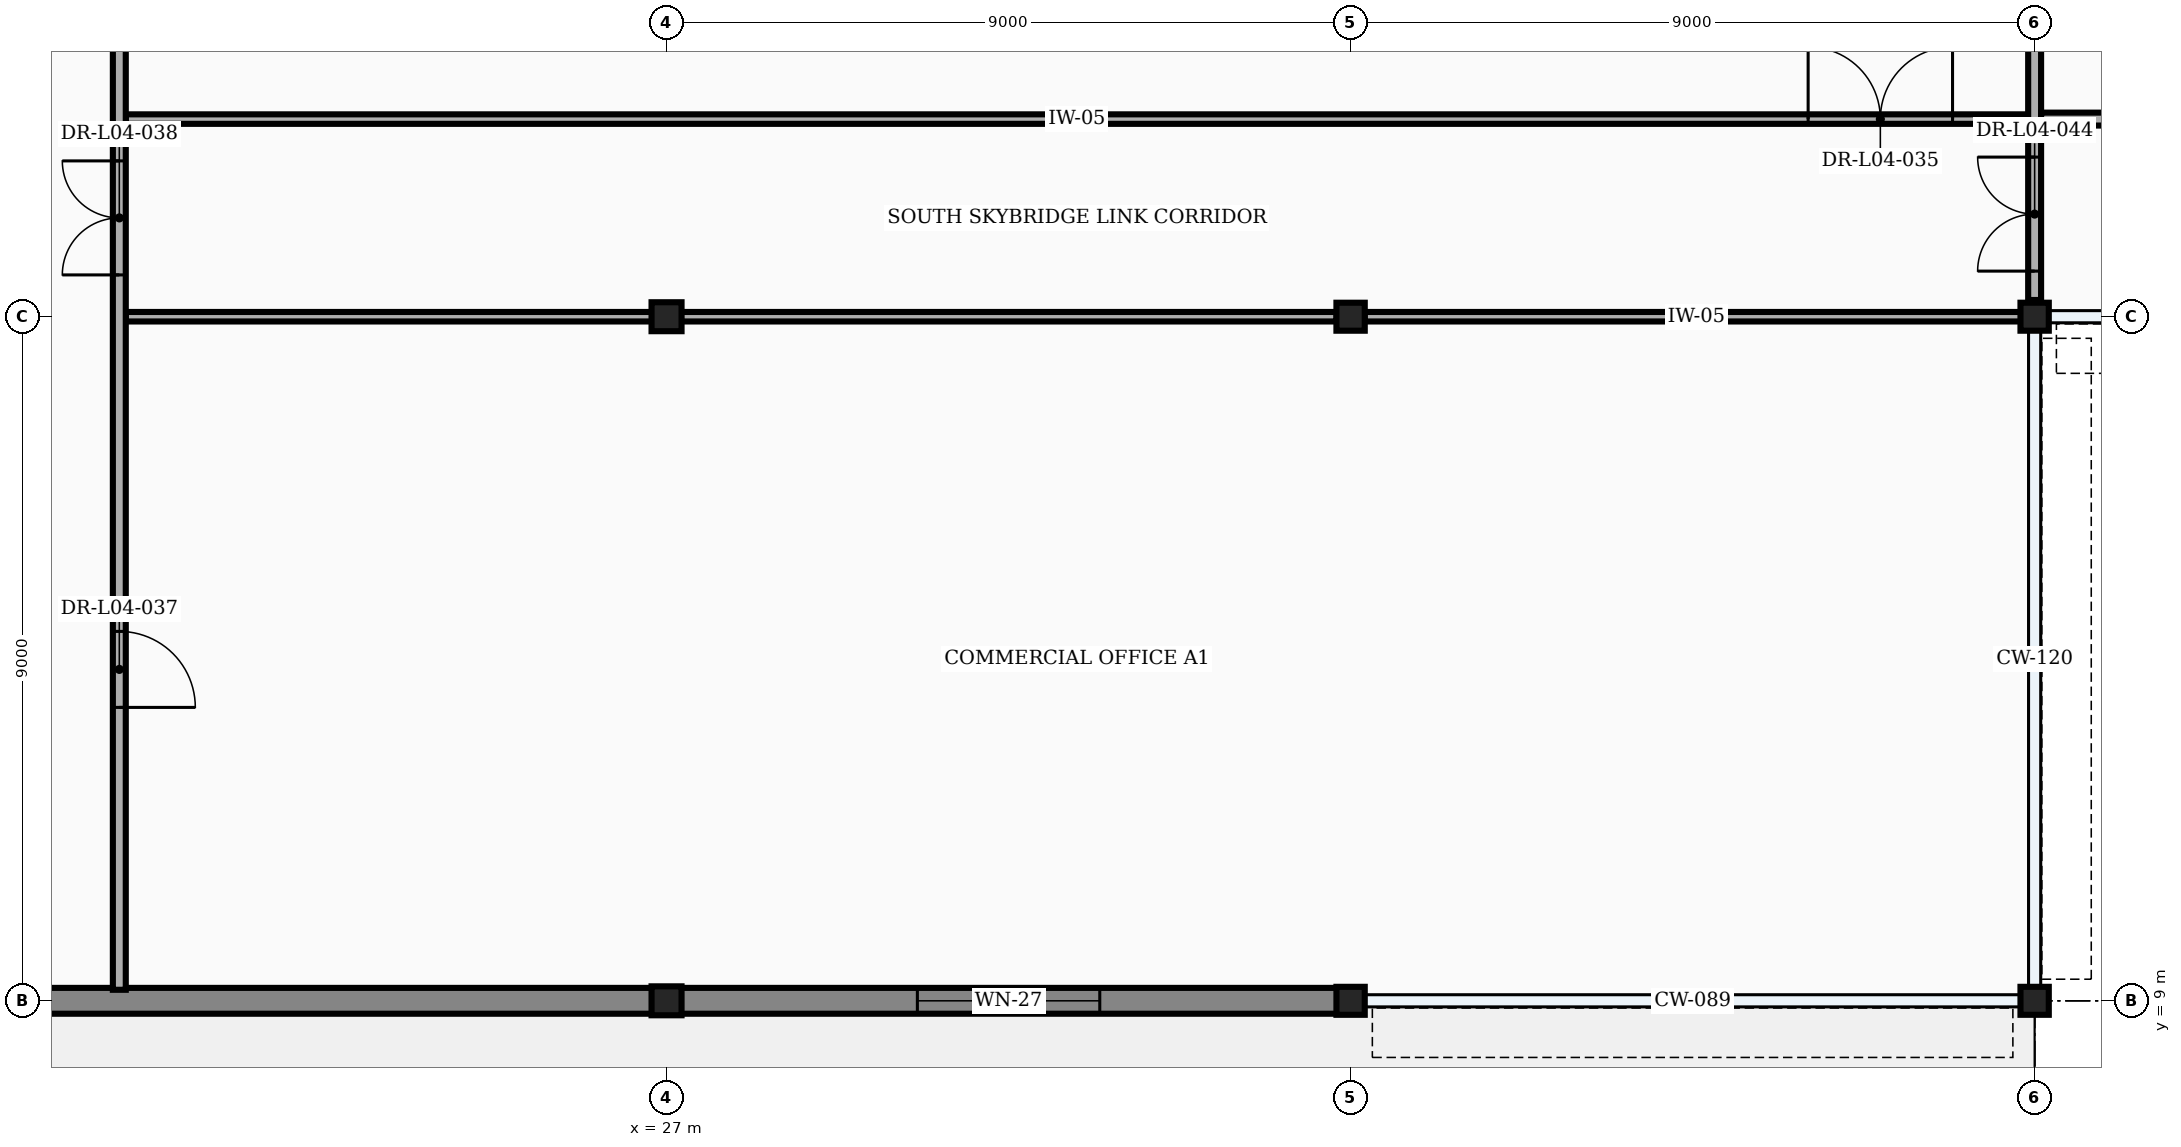
"""IFC4 building model, lengths in metres.
Left out: names, types, materials, properties, quantities, classifications, styles, units other than length and angle.
Written with IfcOpenShell. Run it as: python <this file> out.ifc"""

import sys

from ifc_helpers import new_model, si_unit, direction, frame, frame_2d, origin, origin_2d, place, context, subcontext, project, spatial, rectangle, i_section, extrude, element, fill, save


model = new_model("IFC4")
c1 = context("Model", 3, precision=1e-05, world=origin(), true_north=direction((0.0, 1.0)))
c2 = subcontext(c1, "Body", "Model", "MODEL_VIEW")
j1 = project(units=[si_unit("LENGTHUNIT", "METRE"), si_unit("PLANEANGLEUNIT", "RADIAN")], contexts=[c1])
p1 = place(None, origin())
s1 = spatial("IfcSite", under=j1, at=p1, CompositionType="ELEMENT")
p2 = place(p1, origin())
s2 = spatial("IfcBuilding", under=s1, at=p2, CompositionType="ELEMENT")
p3 = place(p2, frame((0.0, 0.0, 21.6)))
s3 = spatial("IfcBuildingStorey", under=s2, at=p3, CompositionType="ELEMENT", Elevation=21.6)
for number, where, z_axis, x_axis in (
    (1, (27.0, 9.0, 0.0), (0.0, 0.0, 1.0), (1.0, 0.0, 0.0)),
    (2, (27.0, 18.0, 0.0), (0.0, 0.0, 1.0), (1.0, 0.0, 0.0)),
):
    element("IfcColumn", number, at=place(p3, frame(where, z_axis=z_axis, x_axis=x_axis)), inside=s3, PredefinedType="COLUMN", context=c2, shape_type="SweptSolid", body=[
        extrude(i_section(OverallWidth=0.395, OverallDepth=0.381, WebThickness=0.018, FlangeThickness=0.03, at=origin_2d()), origin(), (0.0, 0.0, 1.0), 3.9),
    ])
for number, where, z_axis, x_axis in (
    (3, (36.0, 9.0, 0.0), (0.0, 0.0, 1.0), (1.0, 0.0, 0.0)),
    (4, (36.0, 18.0, 0.0), (0.0, 0.0, 1.0), (1.0, 0.0, 0.0)),
    (5, (45.0, 9.0, 0.0), (0.0, 0.0, 1.0), (1.0, 0.0, 0.0)),
    (6, (45.0, 18.0, 0.0), (0.0, 0.0, 1.0), (1.0, 0.0, 0.0)),
):
    element("IfcColumn", number, at=place(p3, frame(where, z_axis=z_axis, x_axis=x_axis)), inside=s3, PredefinedType="COLUMN", context=c2, shape_type="SweptSolid", body=[
        extrude(i_section(OverallWidth=0.373, OverallDepth=0.368, WebThickness=0.014, FlangeThickness=0.024, FilletRadius=0.015, at=origin_2d()), origin(), (0.0, 0.0, 1.0), 3.9),
    ])
p4 = place(p3, frame((9.01, 9.0, 0.0), z_axis=(0.0, 0.0, 1.0), x_axis=(1.0, 0.0, 0.0)))
e7 = element("IfcWall", 7, at=p4, inside=s3, PredefinedType="STANDARD", context=c2, shape_type="SweptSolid", body=[
    extrude(rectangle(XDim=17.98, YDim=0.34, at=frame_2d((8.99, 0.0))), origin(), (0.0, 0.0, 1.0), 3.245),
])
p5 = place(p4, frame((8.39, 0.0, 0.7)))
e8 = element("IfcOpeningElement", 8, at=p5, cuts=e7, PredefinedType="OPENING", context=c2, shape_type="SweptSolid", body=[
    extrude(rectangle(XDim=1.2, YDim=1.95, at=frame_2d((0.6, 0.975))), frame((0.0, 0.182, 0.0), z_axis=(0.0, -1.0, 0.0), x_axis=(1.0, 0.0, 0.0)), (0.0, 0.0, 1.0), 0.364),
])
p6 = place(p3, frame((27.01, 9.0, 0.0), z_axis=(0.0, 0.0, 1.0), x_axis=(1.0, 0.0, 0.0)))
e9 = element("IfcWall", 9, at=p6, inside=s3, PredefinedType="STANDARD", context=c2, shape_type="SweptSolid", body=[
    extrude(rectangle(XDim=8.98, YDim=0.34, at=frame_2d((4.49, 0.0))), origin(), (0.0, 0.0, 1.0), 3.585),
])
p7 = place(p6, frame((3.29, 0.0, 0.7)))
e10 = element("IfcOpeningElement", 10, at=p7, cuts=e9, PredefinedType="OPENING", context=c2, shape_type="SweptSolid", body=[
    extrude(rectangle(XDim=2.4, YDim=1.95, at=frame_2d((1.2, 0.975))), frame((0.0, 0.182, 0.0), z_axis=(0.0, -1.0, 0.0), x_axis=(1.0, 0.0, 0.0)), (0.0, 0.0, 1.0), 0.364),
])
p8 = place(p3, frame((19.885, 18.0, 0.0), z_axis=(0.0, 0.0, 1.0), x_axis=(1.0, 0.0, 0.0)))
e11 = element("IfcWall", 11, at=p8, inside=s3, PredefinedType="PARTITIONING", context=c2, shape_type="SweptSolid", body=[
    extrude(rectangle(XDim=6.925, YDim=0.125, at=frame_2d((3.462, 0.0))), origin(), (0.0, 0.0, 1.0), 3.245),
])
p9 = place(p3, frame((27.19, 18.0, 0.0), z_axis=(0.0, 0.0, 1.0), x_axis=(1.0, 0.0, 0.0)))
e12 = element("IfcWall", 12, at=p9, inside=s3, PredefinedType="PARTITIONING", context=c2, shape_type="SweptSolid", body=[
    extrude(rectangle(XDim=8.625, YDim=0.125, at=frame_2d((4.313, 0.0))), origin(), (0.0, 0.0, 1.0), 3.324),
])
p10 = place(p3, frame((36.184, 18.0, 0.0), z_axis=(0.0, 0.0, 1.0), x_axis=(1.0, 0.0, 0.0)))
e13 = element("IfcWall", 13, at=p10, inside=s3, PredefinedType="PARTITIONING", context=c2, shape_type="SweptSolid", body=[
    extrude(rectangle(XDim=8.731, YDim=0.125, at=frame_2d((4.365, 0.0))), origin(), (0.0, 0.0, 1.0), 3.285),
])
p11 = place(p3, frame((19.885, 20.6, 0.0), z_axis=(0.0, 0.0, 1.0), x_axis=(1.0, 0.0, 0.0)))
e14 = element("IfcWall", 14, at=p11, inside=s3, PredefinedType="PARTITIONING", context=c2, shape_type="SweptSolid", body=[
    extrude(rectangle(XDim=25.03, YDim=0.125, at=frame_2d((12.515, 0.0))), origin(), (0.0, 0.0, 1.0), 3.585),
])
p12 = place(p11, frame((22.135, 0.0, 0.0)))
e15 = element("IfcOpeningElement", 15, at=p12, cuts=e14, PredefinedType="OPENING", context=c2, shape_type="SweptSolid", body=[
    extrude(rectangle(XDim=1.9, YDim=2.35, at=frame_2d((0.95, 1.175))), frame((0.0, 0.074, 0.0), z_axis=(0.0, -1.0, 0.0), x_axis=(1.0, 0.0, 0.0)), (0.0, 0.0, 1.0), 0.149),
])
p13 = place(p3, frame((19.8, 9.145, 0.0), z_axis=(0.0, 0.0, 1.0), x_axis=(0.0, 1.0, 0.0)))
e16 = element("IfcWall", 16, at=p13, inside=s3, PredefinedType="PARTITIONING", context=c2, shape_type="SweptSolid", body=[
    extrude(rectangle(XDim=30.095, YDim=0.17, at=frame_2d((15.047, 0.0))), origin(), (0.0, 0.0, 1.0), 3.585),
])
p14 = place(p13, frame((3.715, 0.0, 0.0)))
e17 = element("IfcOpeningElement", 17, at=p14, cuts=e16, PredefinedType="OPENING", context=c2, shape_type="SweptSolid", body=[
    extrude(rectangle(XDim=1.0, YDim=2.15, at=frame_2d((0.5, 1.075))), frame((0.0, 0.097, 0.0), z_axis=(0.0, -1.0, 0.0), x_axis=(1.0, 0.0, 0.0)), (0.0, 0.0, 1.0), 0.194),
])
p15 = place(p13, frame((9.405, 0.0, 0.0)))
e18 = element("IfcOpeningElement", 18, at=p15, cuts=e16, PredefinedType="OPENING", context=c2, shape_type="SweptSolid", body=[
    extrude(rectangle(XDim=1.5, YDim=2.2, at=frame_2d((0.75, 1.1))), frame((0.0, 0.097, 0.0), z_axis=(0.0, -1.0, 0.0), x_axis=(1.0, 0.0, 0.0)), (0.0, 0.0, 1.0), 0.194),
])
p16 = place(p13, frame((24.515, 0.0, 0.0)))
e19 = element("IfcOpeningElement", 19, at=p16, cuts=e16, PredefinedType="OPENING", context=c2, shape_type="SweptSolid", body=[
    extrude(rectangle(XDim=1.28, YDim=2.2, at=frame_2d((0.64, 1.1))), frame((0.0, 0.097, 0.0), z_axis=(0.0, -1.0, 0.0), x_axis=(1.0, 0.0, 0.0)), (0.0, 0.0, 1.0), 0.194),
])
p17 = place(p3, frame((45.0, 18.22, 0.0), z_axis=(0.0, 0.0, 1.0), x_axis=(0.0, 1.0, 0.0)))
e20 = element("IfcWall", 20, at=p17, inside=s3, PredefinedType="PARTITIONING", context=c2, shape_type="SweptSolid", body=[
    extrude(rectangle(XDim=8.56, YDim=0.17, at=frame_2d((4.28, 0.0))), origin(), (0.0, 0.0, 1.0), 3.052),
])
p18 = place(p17, frame((0.38, 0.0, 0.0)))
e21 = element("IfcOpeningElement", 21, at=p18, cuts=e20, PredefinedType="OPENING", context=c2, shape_type="SweptSolid", body=[
    extrude(rectangle(XDim=1.5, YDim=2.2, at=frame_2d((0.75, 1.1))), frame((0.0, 0.097, 0.0), z_axis=(0.0, -1.0, 0.0), x_axis=(1.0, 0.0, 0.0)), (0.0, 0.0, 1.0), 0.194),
])
p19 = place(p3, frame((45.085, 20.6, 0.0), z_axis=(0.0, 0.0, 1.0), x_axis=(1.0, 0.0, 0.0)))
e22 = element("IfcWall", 22, at=p19, inside=s3, PredefinedType="PARTITIONING", context=c2, shape_type="SweptSolid", body=[
    extrude(rectangle(XDim=107.83, YDim=0.17, at=frame_2d((53.915, 0.0))), origin(), (0.0, 0.0, 1.0), 3.585),
])
p20 = place(p19, frame((14.34, 0.0, 0.0)))
e23 = element("IfcOpeningElement", 23, at=p20, cuts=e22, PredefinedType="OPENING", context=c2, shape_type="SweptSolid", body=[
    extrude(rectangle(XDim=1.15, YDim=2.15, at=frame_2d((0.575, 1.075))), frame((0.0, 0.097, 0.0), z_axis=(0.0, -1.0, 0.0), x_axis=(1.0, 0.0, 0.0)), (0.0, 0.0, 1.0), 0.194),
])
p21 = place(p19, frame((104.34, 0.0, 0.0)))
e24 = element("IfcOpeningElement", 24, at=p21, cuts=e22, PredefinedType="OPENING", context=c2, shape_type="SweptSolid", body=[
    extrude(rectangle(XDim=1.15, YDim=2.15, at=frame_2d((0.575, 1.075))), frame((0.0, 0.097, 0.0), z_axis=(0.0, -1.0, 0.0), x_axis=(1.0, 0.0, 0.0)), (0.0, 0.0, 1.0), 0.194),
])
p22 = place(p7, origin())
e25 = element("IfcWindow", 25, at=p22, inside=s3, PartitioningType="SINGLE_PANEL", PredefinedType="WINDOW", context=c2, shape_type="SweptSolid", body=[
    extrude(rectangle(XDim=2.4, YDim=1.95, at=frame_2d((1.2, 0.975))), frame((0.0, 0.03, 0.0), z_axis=(0.0, -1.0, 0.0), x_axis=(1.0, 0.0, 0.0)), (0.0, 0.0, 1.0), 0.06),
])
fill(e10, e25)
p23 = place(p12, origin())
e26 = element("IfcDoor", 26, at=p23, inside=s3, OperationType="DOUBLE_DOOR_SINGLE_SWING", PredefinedType="DOOR", context=c2, shape_type="SweptSolid", body=[
    extrude(rectangle(XDim=1.9, YDim=2.35, at=frame_2d((0.95, 1.175))), frame((0.0, 0.025, 0.0), z_axis=(0.0, -1.0, 0.0), x_axis=(1.0, 0.0, 0.0)), (0.0, 0.0, 1.0), 0.05),
])
fill(e15, e26)
p24 = place(p14, frame((1.0, 0.0, 0.0), z_axis=(0.0, 0.0, 1.0), x_axis=(-1.0, 0.0, 0.0)))
e27 = element("IfcDoor", 27, at=p24, inside=s3, OperationType="SINGLE_SWING_RIGHT", PredefinedType="DOOR", context=c2, shape_type="SweptSolid", body=[
    extrude(rectangle(XDim=1.0, YDim=2.15, at=frame_2d((0.5, 1.075))), frame((0.0, 0.025, 0.0), z_axis=(0.0, -1.0, 0.0), x_axis=(1.0, 0.0, 0.0)), (0.0, 0.0, 1.0), 0.05),
])
fill(e17, e27)
p25 = place(p15, origin())
e28 = element("IfcDoor", 28, at=p25, inside=s3, OperationType="DOUBLE_DOOR_SINGLE_SWING", PredefinedType="DOOR", context=c2, shape_type="SweptSolid", body=[
    extrude(rectangle(XDim=1.5, YDim=2.2, at=frame_2d((0.75, 1.1))), frame((0.0, 0.025, 0.0), z_axis=(0.0, -1.0, 0.0), x_axis=(1.0, 0.0, 0.0)), (0.0, 0.0, 1.0), 0.05),
])
fill(e18, e28)
p26 = place(p18, origin())
e29 = element("IfcDoor", 29, at=p26, inside=s3, OperationType="DOUBLE_DOOR_SINGLE_SWING", PredefinedType="DOOR", context=c2, shape_type="SweptSolid", body=[
    extrude(rectangle(XDim=1.5, YDim=2.2, at=frame_2d((0.75, 1.1))), frame((0.0, 0.025, 0.0), z_axis=(0.0, -1.0, 0.0), x_axis=(1.0, 0.0, 0.0)), (0.0, 0.0, 1.0), 0.05),
])
fill(e21, e29)
save(model, sys.argv[1])
